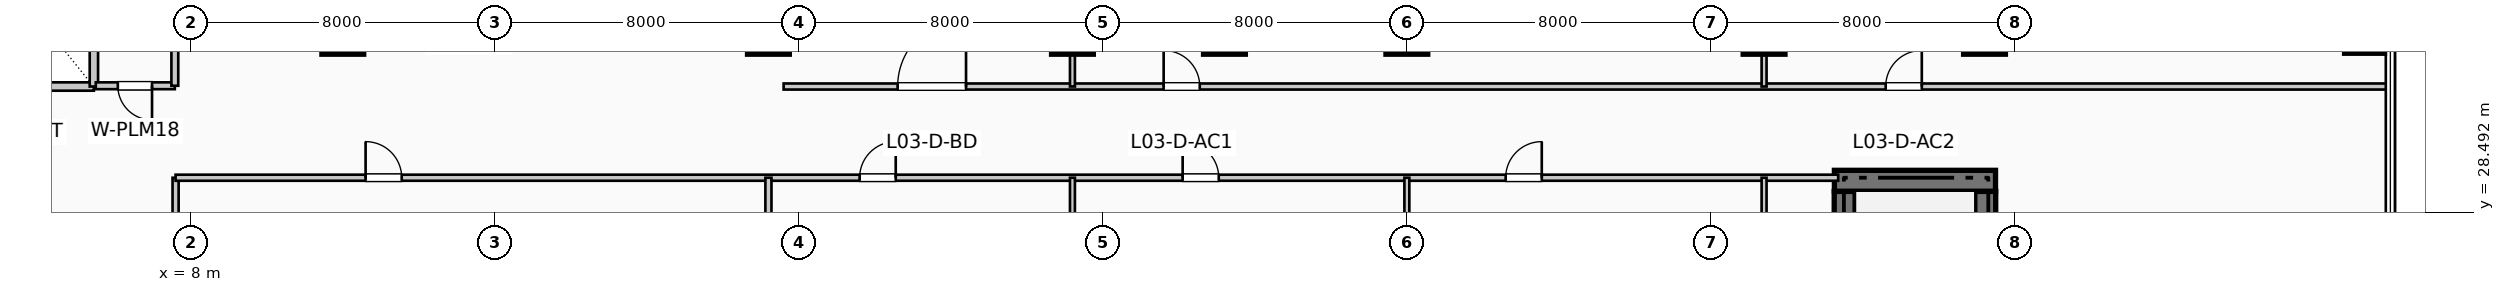
"""IFC4 building model, lengths in metres.
Left out: names, types, materials, properties, quantities, classifications, styles, units other than length and angle.
Written with IfcOpenShell. Run it as: python <this file> out.ifc"""

import sys

from ifc_helpers import new_model, si_unit, direction, frame, frame_2d, origin, origin_2d, place, context, subcontext, project, spatial, rectangle, extrude, element, fill, save


model = new_model("IFC4")
c1 = context("Model", 3, precision=1e-05, world=origin(), true_north=direction((0.0, 1.0)))
c2 = subcontext(c1, "Body", "Model", "MODEL_VIEW")
j1 = project(units=[si_unit("LENGTHUNIT", "METRE"), si_unit("PLANEANGLEUNIT", "RADIAN")], contexts=[c1])
p1 = place(None, origin())
s1 = spatial("IfcSite", under=j1, at=p1, CompositionType="ELEMENT")
p2 = place(p1, origin())
s2 = spatial("IfcBuilding", under=s1, at=p2, CompositionType="ELEMENT")
p3 = place(p2, frame((0.0, 0.0, 16.5)))
s3 = spatial("IfcBuildingStorey", under=s2, at=p3, CompositionType="ELEMENT", Elevation=16.5)
for number, where, z_axis, x_axis in (
    (1, (51.52, 21.15, 0.0), (0.0, 0.0, 1.0), (0.0, 1.0, 0.0)),
    (2, (55.22, 21.15, 0.0), (0.0, 0.0, 1.0), (0.0, 1.0, 0.0)),
):
    element("IfcWall", number, at=place(p3, frame(where, z_axis=z_axis, x_axis=x_axis)), inside=s3, PredefinedType="SHEAR", context=c2, shape_type="SweptSolid", body=[
        extrude(rectangle(XDim=7.89, YDim=0.55, at=frame_2d((3.945, 0.0))), origin(), (0.0, 0.0, 1.0), 4.62),
    ])
p4 = place(p3, frame((51.25, 29.32, 0.0), z_axis=(0.0, 0.0, 1.0), x_axis=(1.0, 0.0, 0.0)))
e3 = element("IfcWall", 3, at=p4, inside=s3, PredefinedType="SHEAR", context=c2, shape_type="SweptSolid", body=[
    extrude(rectangle(XDim=4.24, YDim=0.55, at=frame_2d((2.12, 0.0))), origin(), (0.0, 0.0, 1.0), 4.62),
])
for number, where, z_axis, x_axis in (
    (4, (12.0, 33.2, 0.0), (0.0, 0.0, 1.0), (1.0, 0.0, 0.0)),
    (5, (23.2, 33.2, 0.0), (0.0, 0.0, 1.0), (1.0, 0.0, 0.0)),
    (6, (31.2, 33.2, 0.0), (0.0, 0.0, 1.0), (1.0, 0.0, 0.0)),
    (7, (35.2, 33.2, 0.0), (0.0, 0.0, 1.0), (1.0, 0.0, 0.0)),
    (8, (40.0, 33.2, 0.0), (0.0, 0.0, 1.0), (1.0, 0.0, 0.0)),
    (9, (49.4, 33.2, 0.0), (0.0, 0.0, 1.0), (1.0, 0.0, 0.0)),
    (10, (55.2, 33.2, 0.0), (0.0, 0.0, 1.0), (1.0, 0.0, 0.0)),
):
    element("IfcColumn", number, at=place(p3, frame(where, z_axis=z_axis, x_axis=x_axis)), inside=s3, PredefinedType="COLUMN", context=c2, shape_type="SweptSolid", body=[
        extrude(rectangle(XDim=1.1, YDim=1.1, at=origin_2d()), origin(), (0.0, 0.0, 1.0), 4.62),
    ])
p5 = place(p3, frame((65.2, 33.2, 0.0), z_axis=(0.0, 0.0, 1.0), x_axis=(1.0, 0.0, 0.0)))
e11 = element("IfcColumn", 11, at=p5, inside=s3, PredefinedType="COLUMN", context=c2, shape_type="SweptSolid", body=[
    extrude(rectangle(XDim=1.05, YDim=1.05, at=origin_2d()), origin(), (0.0, 0.0, 1.0), 4.62),
])
p6 = place(p3, frame((1.55, 31.8, 0.0), z_axis=(0.0, 0.0, 1.0), x_axis=(1.0, 0.0, 0.0)))
e12 = element("IfcWall", 12, at=p6, inside=s3, PredefinedType="PARTITIONING", context=c2, shape_type="SweptSolid", body=[
    extrude(rectangle(XDim=3.9, YDim=0.22, at=frame_2d((1.95, 0.0))), origin(), (0.0, 0.0, 1.0), 4.3),
])
p7 = place(p3, frame((5.45, 31.8, 0.0), z_axis=(0.0, 0.0, 1.0), x_axis=(0.0, 1.0, 0.0)))
e13 = element("IfcWall", 13, at=p7, inside=s3, PredefinedType="PARTITIONING", context=c2, shape_type="SweptSolid", body=[
    extrude(rectangle(XDim=2.38, YDim=0.22, at=frame_2d((1.19, 0.0))), origin(), (0.0, 0.0, 1.0), 4.3),
])
p8 = place(p3, frame((5.5, 31.82, 0.0), z_axis=(0.0, 0.0, 1.0), x_axis=(1.0, 0.0, 0.0)))
e14 = element("IfcWall", 14, at=p8, inside=s3, PredefinedType="PLUMBINGWALL", context=c2, shape_type="SweptSolid", body=[
    extrude(rectangle(XDim=2.08, YDim=0.18, at=frame_2d((1.04, 0.0))), origin(), (0.0, 0.0, 1.0), 4.3),
])
p9 = place(p8, frame((1.48, 0.0, 0.0), z_axis=(0.0, 0.0, 1.0), x_axis=(-1.0, 0.0, 0.0)))
e15 = element("IfcOpeningElement", 15, at=p9, cuts=e14, PredefinedType="OPENING", context=c2, shape_type="SweptSolid", body=[
    extrude(rectangle(XDim=0.9, YDim=2.1, at=frame_2d((0.45, 1.05))), frame((0.0, 0.1, 0.0), z_axis=(0.0, -1.0, 0.0), x_axis=(1.0, 0.0, 0.0)), (0.0, 0.0, 1.0), 0.2),
])
p10 = place(p3, frame((7.58, 31.82, 0.0), z_axis=(0.0, 0.0, 1.0), x_axis=(0.0, 1.0, 0.0)))
e16 = element("IfcWall", 16, at=p10, inside=s3, PredefinedType="PLUMBINGWALL", context=c2, shape_type="SweptSolid", body=[
    extrude(rectangle(XDim=2.36, YDim=0.18, at=frame_2d((1.18, 0.0))), origin(), (0.0, 0.0, 1.0), 4.3),
])
p11 = place(p3, frame((7.6, -1.81, 0.0), z_axis=(0.0, 0.0, 1.0), x_axis=(0.0, 1.0, 0.0)))
e17 = element("IfcWall", 17, at=p11, inside=s3, PredefinedType="PARTITIONING", context=c2, shape_type="SweptSolid", body=[
    extrude(rectangle(XDim=31.21, YDim=0.16, at=frame_2d((15.605, 0.0))), origin(), (0.0, 0.0, 1.0), 3.385),
])
p12 = place(p11, frame((3.8, 0.0, 0.0)))
e18 = element("IfcOpeningElement", 18, at=p12, cuts=e17, PredefinedType="OPENING", context=c2, shape_type="SweptSolid", body=[
    extrude(rectangle(XDim=1.8, YDim=2.3, at=frame_2d((0.9, 1.15))), frame((0.0, 0.09, 0.0), z_axis=(0.0, -1.0, 0.0), x_axis=(1.0, 0.0, 0.0)), (0.0, 0.0, 1.0), 0.18),
])
p13 = place(p3, frame((7.6, 29.4, 0.0), z_axis=(0.0, 0.0, 1.0), x_axis=(1.0, 0.0, 0.0)))
e19 = element("IfcWall", 19, at=p13, inside=s3, PredefinedType="PARTITIONING", context=c2, shape_type="SweptSolid", body=[
    extrude(rectangle(XDim=43.75, YDim=0.16, at=frame_2d((21.875, 0.0))), origin(), (0.0, 0.0, 1.0), 3.955),
])
p14 = place(p13, frame((5.0, 0.0, 0.0)))
e20 = element("IfcOpeningElement", 20, at=p14, cuts=e19, PredefinedType="OPENING", context=c2, shape_type="SweptSolid", body=[
    extrude(rectangle(XDim=0.95, YDim=2.15, at=frame_2d((0.475, 1.075))), frame((0.0, 0.09, 0.0), z_axis=(0.0, -1.0, 0.0), x_axis=(1.0, 0.0, 0.0)), (0.0, 0.0, 1.0), 0.18),
])
p15 = place(p13, frame((18.0, 0.0, 0.0)))
e21 = element("IfcOpeningElement", 21, at=p15, cuts=e19, PredefinedType="OPENING", context=c2, shape_type="SweptSolid", body=[
    extrude(rectangle(XDim=0.95, YDim=2.15, at=frame_2d((0.475, 1.075))), frame((0.0, 0.09, 0.0), z_axis=(0.0, -1.0, 0.0), x_axis=(1.0, 0.0, 0.0)), (0.0, 0.0, 1.0), 0.18),
])
p16 = place(p13, frame((26.5, 0.0, 0.0)))
e22 = element("IfcOpeningElement", 22, at=p16, cuts=e19, PredefinedType="OPENING", context=c2, shape_type="SweptSolid", body=[
    extrude(rectangle(XDim=0.95, YDim=2.15, at=frame_2d((0.475, 1.075))), frame((0.0, 0.09, 0.0), z_axis=(0.0, -1.0, 0.0), x_axis=(1.0, 0.0, 0.0)), (0.0, 0.0, 1.0), 0.18),
])
p17 = place(p13, frame((35.0, 0.0, 0.0)))
e23 = element("IfcOpeningElement", 23, at=p17, cuts=e19, PredefinedType="OPENING", context=c2, shape_type="SweptSolid", body=[
    extrude(rectangle(XDim=0.95, YDim=2.15, at=frame_2d((0.475, 1.075))), frame((0.0, 0.09, 0.0), z_axis=(0.0, -1.0, 0.0), x_axis=(1.0, 0.0, 0.0)), (0.0, 0.0, 1.0), 0.18),
])
p18 = place(p3, frame((23.2, -1.81, 0.0), z_axis=(0.0, 0.0, 1.0), x_axis=(0.0, 1.0, 0.0)))
e24 = element("IfcWall", 24, at=p18, inside=s3, PredefinedType="PARTITIONING", context=c2, shape_type="SweptSolid", body=[
    extrude(rectangle(XDim=31.21, YDim=0.16, at=frame_2d((15.605, 0.0))), origin(), (0.0, 0.0, 1.0), 3.485),
])
for number, where, z_axis, x_axis in (
    (25, (31.2, 16.19, 0.0), (0.0, 0.0, 1.0), (0.0, 1.0, 0.0)),
    (26, (40.0, 16.19, 0.0), (0.0, 0.0, 1.0), (0.0, 1.0, 0.0)),
    (27, (49.4, 16.19, 0.0), (0.0, 0.0, 1.0), (0.0, 1.0, 0.0)),
):
    element("IfcWall", number, at=place(p3, frame(where, z_axis=z_axis, x_axis=x_axis)), inside=s3, PredefinedType="PARTITIONING", context=c2, shape_type="SweptSolid", body=[
        extrude(rectangle(XDim=13.21, YDim=0.13, at=frame_2d((6.605, 0.0))), origin(), (0.0, 0.0, 1.0), 3.485),
    ])
p19 = place(p3, frame((23.6, 31.8, 0.0), z_axis=(0.0, 0.0, 1.0), x_axis=(1.0, 0.0, 0.0)))
e28 = element("IfcWall", 28, at=p19, inside=s3, PredefinedType="PARTITIONING", context=c2, shape_type="SweptSolid", body=[
    extrude(rectangle(XDim=42.21, YDim=0.16, at=frame_2d((21.105, 0.0))), origin(), (0.0, 0.0, 1.0), 4.3),
])
p20 = place(p19, frame((3.0, 0.0, 0.0)))
e29 = element("IfcOpeningElement", 29, at=p20, cuts=e28, PredefinedType="OPENING", context=c2, shape_type="SweptSolid", body=[
    extrude(rectangle(XDim=1.8, YDim=2.3, at=frame_2d((0.9, 1.15))), frame((0.0, 0.09, 0.0), z_axis=(0.0, -1.0, 0.0), x_axis=(1.0, 0.0, 0.0)), (0.0, 0.0, 1.0), 0.18),
])
p21 = place(p19, frame((10.0, 0.0, 0.0)))
e30 = element("IfcOpeningElement", 30, at=p21, cuts=e28, PredefinedType="OPENING", context=c2, shape_type="SweptSolid", body=[
    extrude(rectangle(XDim=0.95, YDim=2.15, at=frame_2d((0.475, 1.075))), frame((0.0, 0.09, 0.0), z_axis=(0.0, -1.0, 0.0), x_axis=(1.0, 0.0, 0.0)), (0.0, 0.0, 1.0), 0.18),
])
p22 = place(p19, frame((29.0, 0.0, 0.0)))
e31 = element("IfcOpeningElement", 31, at=p22, cuts=e28, PredefinedType="OPENING", context=c2, shape_type="SweptSolid", body=[
    extrude(rectangle(XDim=0.95, YDim=2.15, at=frame_2d((0.475, 1.075))), frame((0.0, 0.09, 0.0), z_axis=(0.0, -1.0, 0.0), x_axis=(1.0, 0.0, 0.0)), (0.0, 0.0, 1.0), 0.18),
])
for number, where, z_axis, x_axis in (
    (32, (31.2, 31.8, 0.0), (0.0, 0.0, 1.0), (0.0, 1.0, 0.0)),
    (33, (49.4, 31.8, 0.0), (0.0, 0.0, 1.0), (0.0, 1.0, 0.0)),
):
    element("IfcWall", number, at=place(p3, frame(where, z_axis=z_axis, x_axis=x_axis)), inside=s3, PredefinedType="PARTITIONING", context=c2, shape_type="SweptSolid", body=[
        extrude(rectangle(XDim=16.01, YDim=0.13, at=frame_2d((8.005, 0.0))), origin(), (0.0, 0.0, 1.0), 3.485),
    ])
p23 = place(p9, origin())
e34 = element("IfcDoor", 34, at=p23, inside=s3, OperationType="SINGLE_SWING_RIGHT", PredefinedType="DOOR", context=c2, shape_type="SweptSolid", body=[
    extrude(rectangle(XDim=0.9, YDim=2.1, at=frame_2d((0.45, 1.05))), frame((0.0, 0.025, 0.0), z_axis=(0.0, -1.0, 0.0), x_axis=(1.0, 0.0, 0.0)), (0.0, 0.0, 1.0), 0.05),
])
fill(e15, e34)
p24 = place(p14, origin())
e35 = element("IfcDoor", 35, at=p24, inside=s3, OperationType="SINGLE_SWING_LEFT", PredefinedType="DOOR", context=c2, shape_type="SweptSolid", body=[
    extrude(rectangle(XDim=0.95, YDim=2.15, at=frame_2d((0.475, 1.075))), frame((0.0, 0.025, 0.0), z_axis=(0.0, -1.0, 0.0), x_axis=(1.0, 0.0, 0.0)), (0.0, 0.0, 1.0), 0.05),
])
fill(e20, e35)
p25 = place(p15, origin())
e36 = element("IfcDoor", 36, at=p25, inside=s3, OperationType="SINGLE_SWING_RIGHT", PredefinedType="DOOR", context=c2, shape_type="SweptSolid", body=[
    extrude(rectangle(XDim=0.95, YDim=2.15, at=frame_2d((0.475, 1.075))), frame((0.0, 0.025, 0.0), z_axis=(0.0, -1.0, 0.0), x_axis=(1.0, 0.0, 0.0)), (0.0, 0.0, 1.0), 0.05),
])
fill(e21, e36)
p26 = place(p16, origin())
e37 = element("IfcDoor", 37, at=p26, inside=s3, OperationType="SINGLE_SWING_LEFT", PredefinedType="DOOR", context=c2, shape_type="SweptSolid", body=[
    extrude(rectangle(XDim=0.95, YDim=2.15, at=frame_2d((0.475, 1.075))), frame((0.0, 0.025, 0.0), z_axis=(0.0, -1.0, 0.0), x_axis=(1.0, 0.0, 0.0)), (0.0, 0.0, 1.0), 0.05),
])
fill(e22, e37)
p27 = place(p17, origin())
e38 = element("IfcDoor", 38, at=p27, inside=s3, OperationType="SINGLE_SWING_RIGHT", PredefinedType="DOOR", context=c2, shape_type="SweptSolid", body=[
    extrude(rectangle(XDim=0.95, YDim=2.15, at=frame_2d((0.475, 1.075))), frame((0.0, 0.025, 0.0), z_axis=(0.0, -1.0, 0.0), x_axis=(1.0, 0.0, 0.0)), (0.0, 0.0, 1.0), 0.05),
])
fill(e23, e38)
p28 = place(p20, origin())
e39 = element("IfcDoor", 39, at=p28, inside=s3, OperationType="SINGLE_SWING_RIGHT", PredefinedType="DOOR", context=c2, shape_type="SweptSolid", body=[
    extrude(rectangle(XDim=1.8, YDim=2.3, at=frame_2d((0.9, 1.15))), frame((0.0, 0.025, 0.0), z_axis=(0.0, -1.0, 0.0), x_axis=(1.0, 0.0, 0.0)), (0.0, 0.0, 1.0), 0.05),
])
fill(e29, e39)
p29 = place(p21, origin())
e40 = element("IfcDoor", 40, at=p29, inside=s3, OperationType="SINGLE_SWING_LEFT", PredefinedType="DOOR", context=c2, shape_type="SweptSolid", body=[
    extrude(rectangle(XDim=0.95, YDim=2.15, at=frame_2d((0.475, 1.075))), frame((0.0, 0.025, 0.0), z_axis=(0.0, -1.0, 0.0), x_axis=(1.0, 0.0, 0.0)), (0.0, 0.0, 1.0), 0.05),
])
fill(e30, e40)
p30 = place(p22, origin())
e41 = element("IfcDoor", 41, at=p30, inside=s3, OperationType="SINGLE_SWING_RIGHT", PredefinedType="DOOR", context=c2, shape_type="SweptSolid", body=[
    extrude(rectangle(XDim=0.95, YDim=2.15, at=frame_2d((0.475, 1.075))), frame((0.0, 0.025, 0.0), z_axis=(0.0, -1.0, 0.0), x_axis=(1.0, 0.0, 0.0)), (0.0, 0.0, 1.0), 0.05),
])
fill(e31, e41)
save(model, sys.argv[1])
